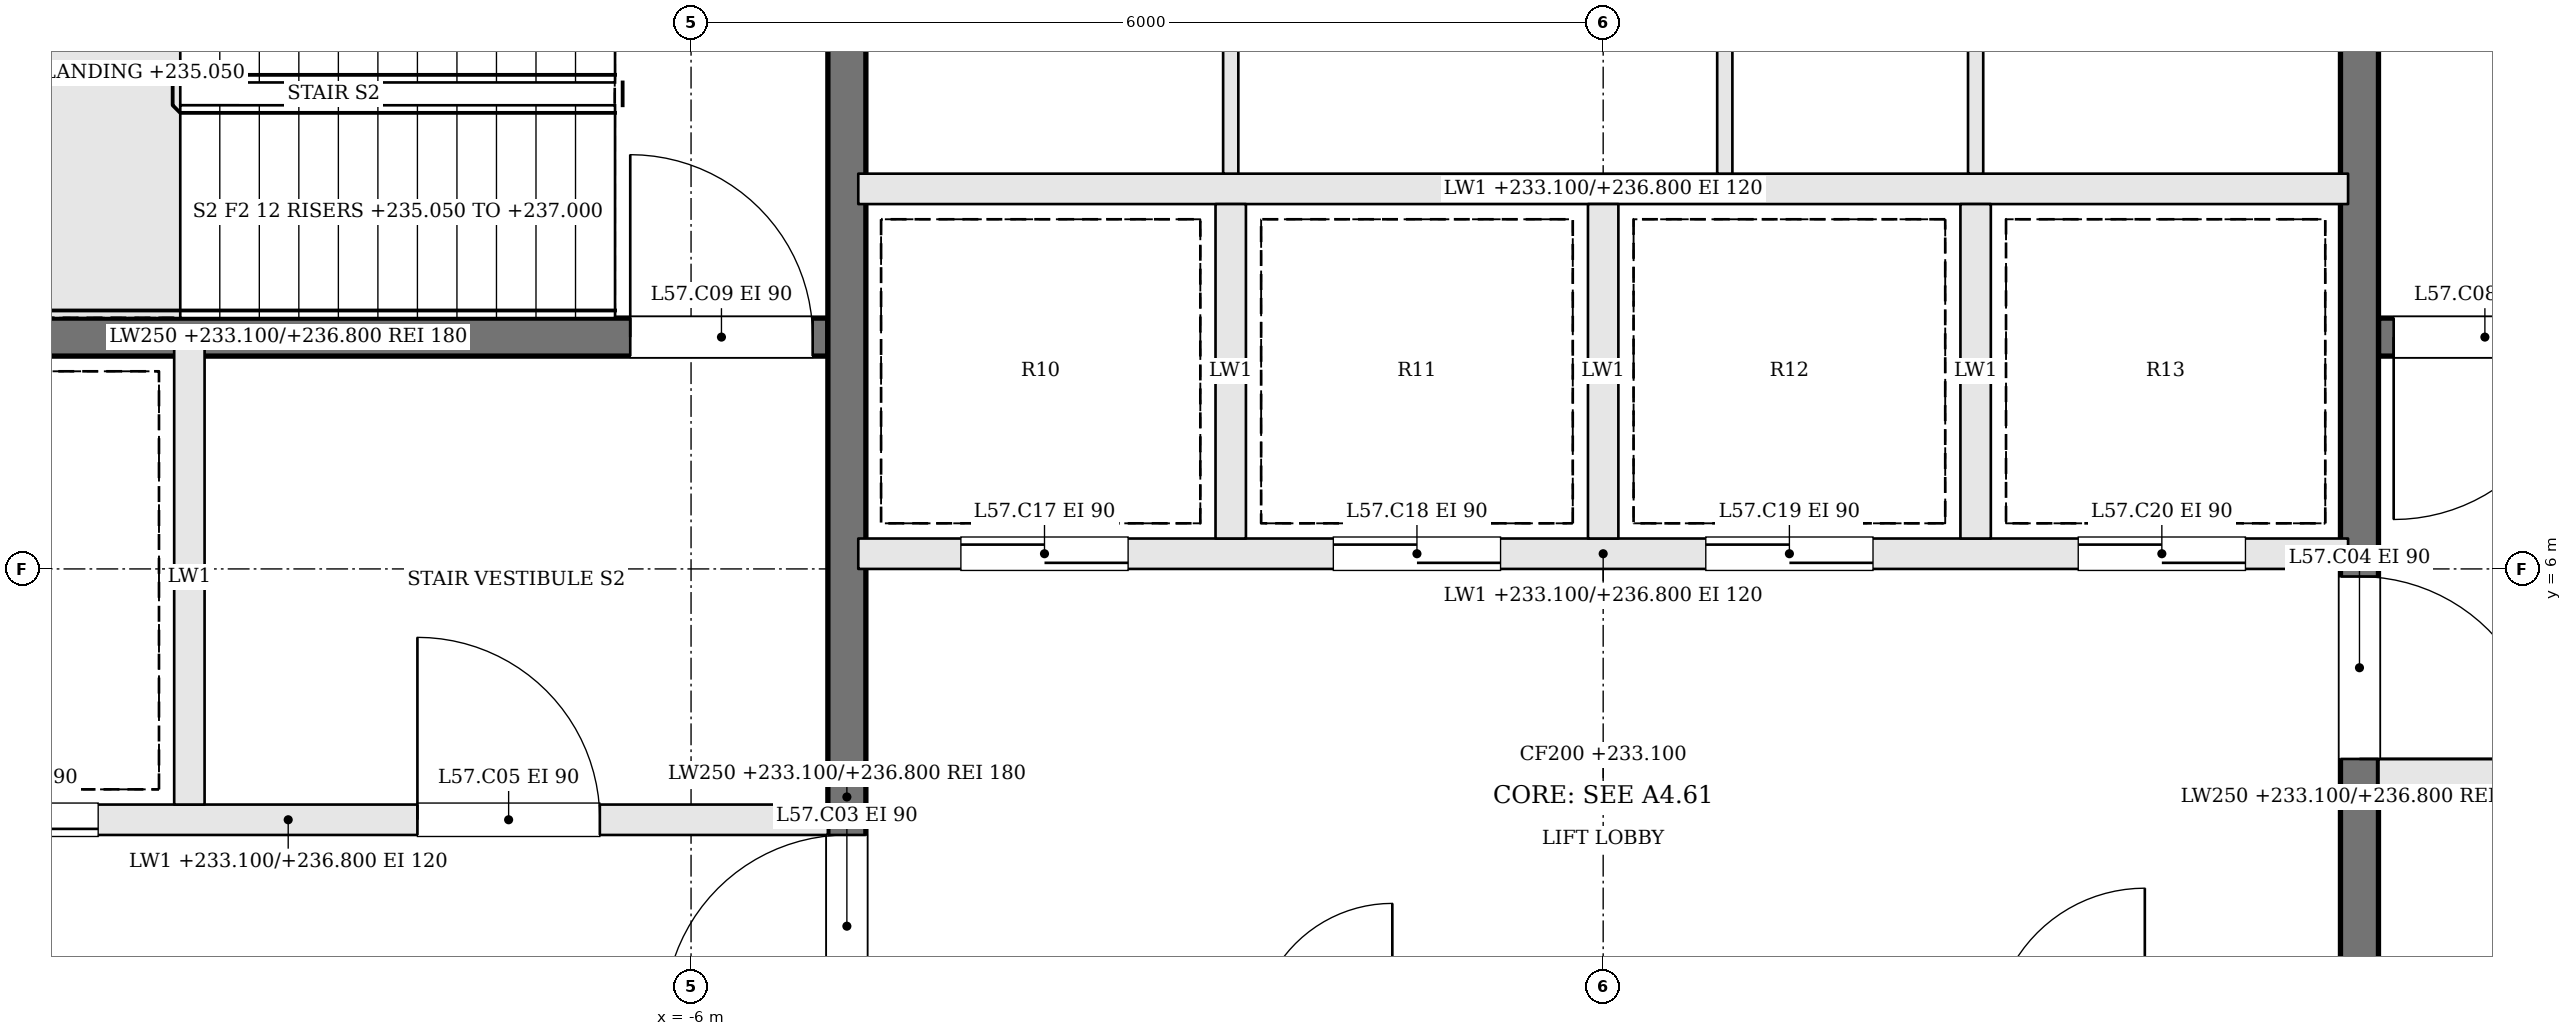
"""IFC4 building model, lengths in metres.
Left out: names, types, materials, properties, quantities, classifications, styles, units other than length and angle.
Written with IfcOpenShell. Run it as: python <this file> out.ifc"""

import sys

from ifc_helpers import new_model, si_unit, direction, frame, frame_2d, origin, place, context, subcontext, project, spatial, rectangle, extrude, element, fill, save


model = new_model("IFC4")
c1 = context("Model", 3, precision=1e-05, world=origin(), true_north=direction((0.0, 1.0)))
c2 = subcontext(c1, "Body", "Model", "MODEL_VIEW")
j1 = project(units=[si_unit("LENGTHUNIT", "METRE"), si_unit("PLANEANGLEUNIT", "RADIAN")], contexts=[c1])
p1 = place(None, origin())
s1 = spatial("IfcSite", under=j1, at=p1, CompositionType="ELEMENT")
p2 = place(p1, origin())
s2 = spatial("IfcBuilding", under=s1, at=p2, CompositionType="ELEMENT")
p3 = place(p2, frame((0.0, 0.0, 233.1)))
s3 = spatial("IfcBuildingStorey", under=s2, at=p3, CompositionType="ELEMENT", Elevation=233.1)
p4 = place(p3, frame((12.2, 7.525, 0.0), z_axis=(0.0, 0.0, 1.0), x_axis=(-1.0, 0.0, 0.0)))
e1 = element("IfcWall", 1, at=p4, inside=s3, PredefinedType="SOLIDWALL", context=c2, shape_type="SweptSolid", body=[
    extrude(rectangle(XDim=7.1, YDim=0.25, at=frame_2d((3.55, 0.0))), origin(), (0.0, 0.0, 1.0), 3.7),
])
p5 = place(p4, frame((5.8, 0.0, 0.0)))
e2 = element("IfcOpeningElement", 2, at=p5, cuts=e1, PredefinedType="OPENING", context=c2, shape_type="SweptSolid", body=[
    extrude(rectangle(XDim=1.2, YDim=2.1, at=frame_2d((0.6, 1.05))), frame((0.0, 0.135, 0.0), z_axis=(0.0, -1.0, 0.0), x_axis=(1.0, 0.0, 0.0)), (0.0, 0.0, 1.0), 0.27),
])
p6 = place(p3, frame((-12.2, 4.35, 0.0), z_axis=(0.0, 0.0, 1.0), x_axis=(1.0, 0.0, 0.0)))
e3 = element("IfcWall", 3, at=p6, inside=s3, PredefinedType="SOLIDWALL", context=c2, shape_type="SweptSolid", body=[
    extrude(rectangle(XDim=7.1, YDim=0.2, at=frame_2d((3.55, 0.0))), origin(), (0.0, 0.0, 1.0), 3.7),
])
p7 = place(p6, frame((4.4, 0.0, 0.0)))
e4 = element("IfcOpeningElement", 4, at=p7, cuts=e3, PredefinedType="OPENING", context=c2, shape_type="SweptSolid", body=[
    extrude(rectangle(XDim=1.2, YDim=2.1, at=frame_2d((0.6, 1.05))), frame((0.0, 0.11, 0.0), z_axis=(0.0, -1.0, 0.0), x_axis=(1.0, 0.0, 0.0)), (0.0, 0.0, 1.0), 0.22),
])
p8 = place(p6, frame((1.1, 0.0, 0.0)))
e5 = element("IfcOpeningElement", 5, at=p8, cuts=e3, PredefinedType="OPENING", context=c2, shape_type="SweptSolid", body=[
    extrude(rectangle(XDim=1.2, YDim=2.1, at=frame_2d((0.6, 1.05))), frame((0.0, 0.11, 0.0), z_axis=(0.0, -1.0, 0.0), x_axis=(1.0, 0.0, 0.0)), (0.0, 0.0, 1.0), 0.22),
])
p9 = place(p3, frame((12.2, 4.65, 0.0), z_axis=(0.0, 0.0, 1.0), x_axis=(-1.0, 0.0, 0.0)))
e6 = element("IfcWall", 6, at=p9, inside=s3, PredefinedType="SOLIDWALL", context=c2, shape_type="SweptSolid", body=[
    extrude(rectangle(XDim=7.1, YDim=0.2, at=frame_2d((3.55, 0.0))), origin(), (0.0, 0.0, 1.0), 3.7),
])
p10 = place(p9, frame((4.4, 0.0, 0.0)))
e7 = element("IfcOpeningElement", 7, at=p10, cuts=e6, PredefinedType="OPENING", context=c2, shape_type="SweptSolid", body=[
    extrude(rectangle(XDim=1.2, YDim=2.1, at=frame_2d((0.6, 1.05))), frame((0.0, 0.11, 0.0), z_axis=(0.0, -1.0, 0.0), x_axis=(1.0, 0.0, 0.0)), (0.0, 0.0, 1.0), 0.22),
])
p11 = place(p9, frame((1.1, 0.0, 0.0)))
e8 = element("IfcOpeningElement", 8, at=p11, cuts=e6, PredefinedType="OPENING", context=c2, shape_type="SweptSolid", body=[
    extrude(rectangle(XDim=1.2, YDim=2.1, at=frame_2d((0.6, 1.05))), frame((0.0, 0.11, 0.0), z_axis=(0.0, -1.0, 0.0), x_axis=(1.0, 0.0, 0.0)), (0.0, 0.0, 1.0), 0.22),
])
p12 = place(p3, frame((-12.2, 7.525, 0.0), z_axis=(0.0, 0.0, 1.0), x_axis=(1.0, 0.0, 0.0)))
e9 = element("IfcWall", 9, at=p12, inside=s3, PredefinedType="SOLIDWALL", context=c2, shape_type="SweptSolid", body=[
    extrude(rectangle(XDim=7.1, YDim=0.25, at=frame_2d((3.55, 0.0))), origin(), (0.0, 0.0, 1.0), 3.7),
])
p13 = place(p12, frame((5.8, 0.0, 0.0)))
e10 = element("IfcOpeningElement", 10, at=p13, cuts=e9, PredefinedType="OPENING", context=c2, shape_type="SweptSolid", body=[
    extrude(rectangle(XDim=1.2, YDim=2.1, at=frame_2d((0.6, 1.05))), frame((0.0, 0.135, 0.0), z_axis=(0.0, -1.0, 0.0), x_axis=(1.0, 0.0, 0.0)), (0.0, 0.0, 1.0), 0.27),
])
p14 = place(p3, frame((-9.3, 4.45, 0.0), z_axis=(0.0, 0.0, 1.0), x_axis=(0.0, 1.0, 0.0)))
e11 = element("IfcWall", 11, at=p14, inside=s3, PredefinedType="SOLIDWALL", context=c2, shape_type="SweptSolid", body=[
    extrude(rectangle(XDim=3.0, YDim=0.2, at=frame_2d((1.5, 0.0))), origin(), (0.0, 0.0, 1.0), 3.7),
])
p15 = place(p3, frame((-4.975, -2.2, 0.0), z_axis=(0.0, 0.0, 1.0), x_axis=(0.0, 1.0, 0.0)))
e12 = element("IfcWall", 12, at=p15, inside=s3, PredefinedType="SOLIDWALL", context=c2, shape_type="SweptSolid", body=[
    extrude(rectangle(XDim=13.4, YDim=0.25, at=frame_2d((6.7, 0.0))), origin(), (0.0, 0.0, 1.0), 3.7),
])
p16 = place(p15, frame((5.25, 0.0, 0.0)))
e13 = element("IfcOpeningElement", 13, at=p16, cuts=e12, PredefinedType="OPENING", context=c2, shape_type="SweptSolid", body=[
    extrude(rectangle(XDim=1.2, YDim=2.1, at=frame_2d((0.6, 1.05))), frame((0.0, 0.135, 0.0), z_axis=(0.0, -1.0, 0.0), x_axis=(1.0, 0.0, 0.0)), (0.0, 0.0, 1.0), 0.27),
])
p17 = place(p3, frame((4.975, 11.2, 0.0), z_axis=(0.0, 0.0, 1.0), x_axis=(0.0, -1.0, 0.0)))
e14 = element("IfcWall", 14, at=p17, inside=s3, PredefinedType="SOLIDWALL", context=c2, shape_type="SweptSolid", body=[
    extrude(rectangle(XDim=13.4, YDim=0.25, at=frame_2d((6.7, 0.0))), origin(), (0.0, 0.0, 1.0), 3.7),
])
p18 = place(p17, frame((5.25, 0.0, 0.0)))
e15 = element("IfcOpeningElement", 15, at=p18, cuts=e14, PredefinedType="OPENING", context=c2, shape_type="SweptSolid", body=[
    extrude(rectangle(XDim=1.2, YDim=2.1, at=frame_2d((0.6, 1.05))), frame((0.0, 0.135, 0.0), z_axis=(0.0, -1.0, 0.0), x_axis=(1.0, 0.0, 0.0)), (0.0, 0.0, 1.0), 0.27),
])
p19 = place(p3, frame((-4.9, 6.1, 0.0), z_axis=(0.0, 0.0, 1.0), x_axis=(1.0, 0.0, 0.0)))
e16 = element("IfcWall", 16, at=p19, inside=s3, PredefinedType="SOLIDWALL", context=c2, shape_type="SweptSolid", body=[
    extrude(rectangle(XDim=9.8, YDim=0.2, at=frame_2d((4.9, 0.0))), origin(), (0.0, 0.0, 1.0), 3.7),
])
p20 = place(p19, frame((0.675, 0.0, 0.0)))
e17 = element("IfcOpeningElement", 17, at=p20, cuts=e16, PredefinedType="OPENING", context=c2, shape_type="SweptSolid", body=[
    extrude(rectangle(XDim=1.1, YDim=2.1, at=frame_2d((0.55, 1.05))), frame((0.0, 0.11, 0.0), z_axis=(0.0, -1.0, 0.0), x_axis=(1.0, 0.0, 0.0)), (0.0, 0.0, 1.0), 0.22),
])
p21 = place(p19, frame((3.125, 0.0, 0.0)))
e18 = element("IfcOpeningElement", 18, at=p21, cuts=e16, PredefinedType="OPENING", context=c2, shape_type="SweptSolid", body=[
    extrude(rectangle(XDim=1.1, YDim=2.1, at=frame_2d((0.55, 1.05))), frame((0.0, 0.11, 0.0), z_axis=(0.0, -1.0, 0.0), x_axis=(1.0, 0.0, 0.0)), (0.0, 0.0, 1.0), 0.22),
])
p22 = place(p19, frame((5.575, 0.0, 0.0)))
e19 = element("IfcOpeningElement", 19, at=p22, cuts=e16, PredefinedType="OPENING", context=c2, shape_type="SweptSolid", body=[
    extrude(rectangle(XDim=1.1, YDim=2.1, at=frame_2d((0.55, 1.05))), frame((0.0, 0.11, 0.0), z_axis=(0.0, -1.0, 0.0), x_axis=(1.0, 0.0, 0.0)), (0.0, 0.0, 1.0), 0.22),
])
p23 = place(p19, frame((8.025, 0.0, 0.0)))
e20 = element("IfcOpeningElement", 20, at=p23, cuts=e16, PredefinedType="OPENING", context=c2, shape_type="SweptSolid", body=[
    extrude(rectangle(XDim=1.1, YDim=2.1, at=frame_2d((0.55, 1.05))), frame((0.0, 0.11, 0.0), z_axis=(0.0, -1.0, 0.0), x_axis=(1.0, 0.0, 0.0)), (0.0, 0.0, 1.0), 0.22),
])
p24 = place(p3, frame((-4.9, 8.5, 0.0), z_axis=(0.0, 0.0, 1.0), x_axis=(1.0, 0.0, 0.0)))
e21 = element("IfcWall", 21, at=p24, inside=s3, PredefinedType="SOLIDWALL", context=c2, shape_type="SweptSolid", body=[
    extrude(rectangle(XDim=9.8, YDim=0.2, at=frame_2d((4.9, 0.0))), origin(), (0.0, 0.0, 1.0), 3.7),
])
for number, where, z_axis, x_axis in (
    (22, (-2.45, 6.2, 0.0), (0.0, 0.0, 1.0), (0.0, 1.0, 0.0)),
    (23, (0.0, 6.2, 0.0), (0.0, 0.0, 1.0), (0.0, 1.0, 0.0)),
    (24, (2.45, 6.2, 0.0), (0.0, 0.0, 1.0), (0.0, 1.0, 0.0)),
):
    element("IfcWall", number, at=place(p3, frame(where, z_axis=z_axis, x_axis=x_axis)), inside=s3, PredefinedType="SOLIDWALL", context=c2, shape_type="SweptSolid", body=[
        extrude(rectangle(XDim=2.2, YDim=0.2, at=frame_2d((1.1, 0.0))), origin(), (0.0, 0.0, 1.0), 3.7),
    ])
for number, where, z_axis, x_axis in (
    (25, (-2.45, 8.6, 0.0), (0.0, 0.0, 1.0), (0.0, 1.0, 0.0)),
    (26, (0.8, 8.6, 0.0), (0.0, 0.0, 1.0), (0.0, 1.0, 0.0)),
    (27, (2.45, 8.6, 0.0), (0.0, 0.0, 1.0), (0.0, 1.0, 0.0)),
):
    element("IfcWall", number, at=place(p3, frame(where, z_axis=z_axis, x_axis=x_axis)), inside=s3, PredefinedType="PARTITIONING", context=c2, shape_type="SweptSolid", body=[
        extrude(rectangle(XDim=2.6, YDim=0.1, at=frame_2d((1.3, 0.0))), origin(), (0.0, 0.0, 1.0), 3.7),
    ])
p25 = place(p16, origin())
e28 = element("IfcDoor", 28, at=p25, inside=s3, OperationType="SINGLE_SWING_LEFT", PredefinedType="DOOR", context=c2, shape_type="SweptSolid", body=[
    extrude(rectangle(XDim=1.2, YDim=2.1, at=frame_2d((0.6, 1.05))), frame((0.0, 0.025, 0.0), z_axis=(0.0, -1.0, 0.0), x_axis=(1.0, 0.0, 0.0)), (0.0, 0.0, 1.0), 0.05),
])
fill(e13, e28)
p26 = place(p18, origin())
e29 = element("IfcDoor", 29, at=p26, inside=s3, OperationType="SINGLE_SWING_RIGHT", PredefinedType="DOOR", context=c2, shape_type="SweptSolid", body=[
    extrude(rectangle(XDim=1.2, YDim=2.1, at=frame_2d((0.6, 1.05))), frame((0.0, 0.025, 0.0), z_axis=(0.0, -1.0, 0.0), x_axis=(1.0, 0.0, 0.0)), (0.0, 0.0, 1.0), 0.05),
])
fill(e15, e29)
p27 = place(p7, origin())
e30 = element("IfcDoor", 30, at=p27, inside=s3, OperationType="SINGLE_SWING_LEFT", PredefinedType="DOOR", context=c2, shape_type="SweptSolid", body=[
    extrude(rectangle(XDim=1.2, YDim=2.1, at=frame_2d((0.6, 1.05))), frame((0.0, 0.025, 0.0), z_axis=(0.0, -1.0, 0.0), x_axis=(1.0, 0.0, 0.0)), (0.0, 0.0, 1.0), 0.05),
])
fill(e4, e30)
p28 = place(p5, origin())
e31 = element("IfcDoor", 31, at=p28, inside=s3, OperationType="SINGLE_SWING_RIGHT", PredefinedType="DOOR", context=c2, shape_type="SweptSolid", body=[
    extrude(rectangle(XDim=1.2, YDim=2.1, at=frame_2d((0.6, 1.05))), frame((0.0, 0.025, 0.0), z_axis=(0.0, -1.0, 0.0), x_axis=(1.0, 0.0, 0.0)), (0.0, 0.0, 1.0), 0.05),
])
fill(e2, e31)
p29 = place(p13, origin())
e32 = element("IfcDoor", 32, at=p29, inside=s3, OperationType="SINGLE_SWING_LEFT", PredefinedType="DOOR", context=c2, shape_type="SweptSolid", body=[
    extrude(rectangle(XDim=1.2, YDim=2.1, at=frame_2d((0.6, 1.05))), frame((0.0, 0.025, 0.0), z_axis=(0.0, -1.0, 0.0), x_axis=(1.0, 0.0, 0.0)), (0.0, 0.0, 1.0), 0.05),
])
fill(e10, e32)
p30 = place(p8, origin())
e33 = element("IfcDoor", 33, at=p30, inside=s3, OperationType="SLIDING_TO_RIGHT", PredefinedType="DOOR", context=c2, shape_type="SweptSolid", body=[
    extrude(rectangle(XDim=1.2, YDim=2.1, at=frame_2d((0.6, 1.05))), frame((0.0, 0.025, 0.0), z_axis=(0.0, -1.0, 0.0), x_axis=(1.0, 0.0, 0.0)), (0.0, 0.0, 1.0), 0.05),
])
fill(e5, e33)
p31 = place(p20, origin())
e34 = element("IfcDoor", 34, at=p31, inside=s3, OperationType="SLIDING_TO_RIGHT", PredefinedType="DOOR", context=c2, shape_type="SweptSolid", body=[
    extrude(rectangle(XDim=1.1, YDim=2.1, at=frame_2d((0.55, 1.05))), frame((0.0, 0.025, 0.0), z_axis=(0.0, -1.0, 0.0), x_axis=(1.0, 0.0, 0.0)), (0.0, 0.0, 1.0), 0.05),
])
fill(e17, e34)
p32 = place(p21, origin())
e35 = element("IfcDoor", 35, at=p32, inside=s3, OperationType="SLIDING_TO_LEFT", PredefinedType="DOOR", context=c2, shape_type="SweptSolid", body=[
    extrude(rectangle(XDim=1.1, YDim=2.1, at=frame_2d((0.55, 1.05))), frame((0.0, 0.025, 0.0), z_axis=(0.0, -1.0, 0.0), x_axis=(1.0, 0.0, 0.0)), (0.0, 0.0, 1.0), 0.05),
])
fill(e18, e35)
p33 = place(p22, origin())
e36 = element("IfcDoor", 36, at=p33, inside=s3, OperationType="SLIDING_TO_RIGHT", PredefinedType="DOOR", context=c2, shape_type="SweptSolid", body=[
    extrude(rectangle(XDim=1.1, YDim=2.1, at=frame_2d((0.55, 1.05))), frame((0.0, 0.025, 0.0), z_axis=(0.0, -1.0, 0.0), x_axis=(1.0, 0.0, 0.0)), (0.0, 0.0, 1.0), 0.05),
])
fill(e19, e36)
p34 = place(p23, origin())
e37 = element("IfcDoor", 37, at=p34, inside=s3, OperationType="SLIDING_TO_LEFT", PredefinedType="DOOR", context=c2, shape_type="SweptSolid", body=[
    extrude(rectangle(XDim=1.1, YDim=2.1, at=frame_2d((0.55, 1.05))), frame((0.0, 0.025, 0.0), z_axis=(0.0, -1.0, 0.0), x_axis=(1.0, 0.0, 0.0)), (0.0, 0.0, 1.0), 0.05),
])
fill(e20, e37)
save(model, sys.argv[1])
